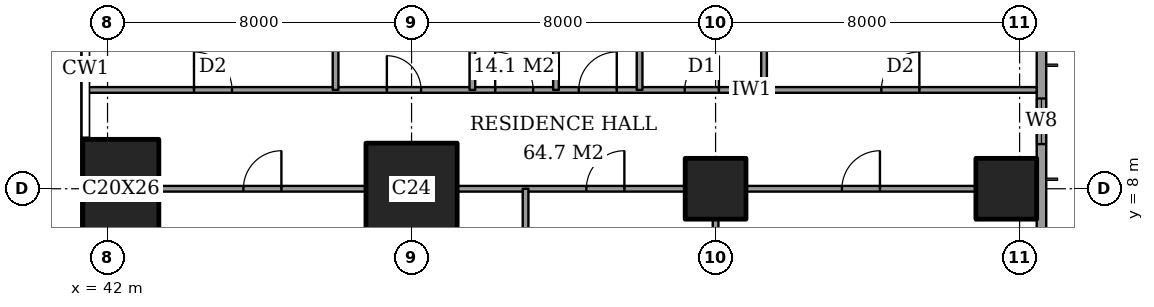
"""IFC4 building model, lengths in metres.
Left out: names, types, materials, properties, quantities, classifications, styles, units other than length and angle.
Written with IfcOpenShell. Run it as: python <this file> out.ifc"""

import sys

from ifc_helpers import new_model, si_unit, direction, frame, frame_2d, origin, origin_2d, place, context, subcontext, project, spatial, rectangle, extrude, element, fill, save


model = new_model("IFC4")
c1 = context("Model", 3, precision=1e-05, world=origin(), true_north=direction((0.0, 1.0)))
c2 = subcontext(c1, "Body", "Model", "MODEL_VIEW")
j1 = project(units=[si_unit("LENGTHUNIT", "METRE"), si_unit("PLANEANGLEUNIT", "RADIAN")], contexts=[c1])
p1 = place(None, origin())
s1 = spatial("IfcSite", under=j1, at=p1, CompositionType="ELEMENT")
p2 = place(p1, origin())
s2 = spatial("IfcBuilding", under=s1, at=p2, CompositionType="ELEMENT")
p3 = place(p2, frame((0.0, 0.0, 270.0)))
s3 = spatial("IfcBuildingStorey", under=s2, at=p3, CompositionType="ELEMENT", Elevation=270.0)
p4 = place(p3, frame((42.35, 8.0, 0.0), z_axis=(0.0, 0.0, 1.0), x_axis=(1.0, 0.0, 0.0)))
e1 = element("IfcColumn", 1, at=p4, inside=s3, PredefinedType="COLUMN", context=c2, shape_type="SweptSolid", body=[
    extrude(rectangle(XDim=2.0, YDim=2.6, at=origin_2d()), origin(), (0.0, 0.0, 1.0), 3.6),
])
p5 = place(p3, frame((50.0, 8.0, 0.0), z_axis=(0.0, 0.0, 1.0), x_axis=(1.0, 0.0, 0.0)))
e2 = element("IfcColumn", 2, at=p5, inside=s3, PredefinedType="COLUMN", context=c2, shape_type="SweptSolid", body=[
    extrude(rectangle(XDim=2.4, YDim=2.4, at=origin_2d()), origin(), (0.0, 0.0, 1.0), 3.6),
])
for number, where, z_axis, x_axis in (
    (3, (58.0, 8.0, 0.0), (0.0, 0.0, 1.0), (1.0, 0.0, 0.0)),
    (4, (65.65, 8.0, 0.0), (0.0, 0.0, 1.0), (1.0, 0.0, 0.0)),
):
    element("IfcColumn", number, at=place(p3, frame(where, z_axis=z_axis, x_axis=x_axis)), inside=s3, PredefinedType="COLUMN", context=c2, shape_type="SweptSolid", body=[
        extrude(rectangle(XDim=1.6, YDim=1.6, at=origin_2d()), origin(), (0.0, 0.0, 1.0), 3.6),
    ])
p6 = place(p3, frame((66.575, 3.175, 0.0), z_axis=(0.0, 0.0, 1.0), x_axis=(0.0, 1.0, 0.0)))
e5 = element("IfcWall", 5, at=p6, inside=s3, PredefinedType="SOLIDWALL", context=c2, shape_type="SweptSolid", body=[
    extrude(rectangle(XDim=41.65, YDim=0.25, at=frame_2d((20.825, 0.0))), origin(), (0.0, 0.0, 1.0), 3.6),
])
p7 = place(p6, frame((0.875, 0.0, 0.6)))
e6 = element("IfcOpeningElement", 6, at=p7, cuts=e5, PredefinedType="OPENING", context=c2, shape_type="SweptSolid", body=[
    extrude(rectangle(XDim=2.4, YDim=2.0, at=frame_2d((1.2, 1.0))), frame((0.0, 0.135, 0.0), z_axis=(0.0, -1.0, 0.0), x_axis=(1.0, 0.0, 0.0)), (0.0, 0.0, 1.0), 0.27),
])
p8 = place(p6, frame((6.0, 0.0, 0.6)))
e7 = element("IfcOpeningElement", 7, at=p8, cuts=e5, PredefinedType="OPENING", context=c2, shape_type="SweptSolid", body=[
    extrude(rectangle(XDim=1.2, YDim=2.0, at=frame_2d((0.6, 1.0))), frame((0.0, 0.135, 0.0), z_axis=(0.0, -1.0, 0.0), x_axis=(1.0, 0.0, 0.0)), (0.0, 0.0, 1.0), 0.27),
])
p9 = place(p6, frame((8.525, 0.0, 0.6)))
e8 = element("IfcOpeningElement", 8, at=p9, cuts=e5, PredefinedType="OPENING", context=c2, shape_type="SweptSolid", body=[
    extrude(rectangle(XDim=2.4, YDim=2.0, at=frame_2d((1.2, 1.0))), frame((0.0, 0.135, 0.0), z_axis=(0.0, -1.0, 0.0), x_axis=(1.0, 0.0, 0.0)), (0.0, 0.0, 1.0), 0.27),
])
p10 = place(p6, frame((15.725, 0.0, 0.6)))
e9 = element("IfcOpeningElement", 9, at=p10, cuts=e5, PredefinedType="OPENING", context=c2, shape_type="SweptSolid", body=[
    extrude(rectangle(XDim=2.4, YDim=2.0, at=frame_2d((1.2, 1.0))), frame((0.0, 0.135, 0.0), z_axis=(0.0, -1.0, 0.0), x_axis=(1.0, 0.0, 0.0)), (0.0, 0.0, 1.0), 0.27),
])
p11 = place(p6, frame((23.625, 0.0, 0.6)))
e10 = element("IfcOpeningElement", 10, at=p11, cuts=e5, PredefinedType="OPENING", context=c2, shape_type="SweptSolid", body=[
    extrude(rectangle(XDim=2.4, YDim=2.0, at=frame_2d((1.2, 1.0))), frame((0.0, 0.135, 0.0), z_axis=(0.0, -1.0, 0.0), x_axis=(1.0, 0.0, 0.0)), (0.0, 0.0, 1.0), 0.27),
])
p12 = place(p6, frame((30.725, 0.0, 0.6)))
e11 = element("IfcOpeningElement", 11, at=p12, cuts=e5, PredefinedType="OPENING", context=c2, shape_type="SweptSolid", body=[
    extrude(rectangle(XDim=2.4, YDim=2.0, at=frame_2d((1.2, 1.0))), frame((0.0, 0.135, 0.0), z_axis=(0.0, -1.0, 0.0), x_axis=(1.0, 0.0, 0.0)), (0.0, 0.0, 1.0), 0.27),
])
p13 = place(p6, frame((34.525, 0.0, 0.6)))
e12 = element("IfcOpeningElement", 12, at=p13, cuts=e5, PredefinedType="OPENING", context=c2, shape_type="SweptSolid", body=[
    extrude(rectangle(XDim=1.2, YDim=2.0, at=frame_2d((0.6, 1.0))), frame((0.0, 0.135, 0.0), z_axis=(0.0, -1.0, 0.0), x_axis=(1.0, 0.0, 0.0)), (0.0, 0.0, 1.0), 0.27),
])
p14 = place(p6, frame((38.375, 0.0, 0.6)))
e13 = element("IfcOpeningElement", 13, at=p14, cuts=e5, PredefinedType="OPENING", context=c2, shape_type="SweptSolid", body=[
    extrude(rectangle(XDim=2.4, YDim=2.0, at=frame_2d((1.2, 1.0))), frame((0.0, 0.135, 0.0), z_axis=(0.0, -1.0, 0.0), x_axis=(1.0, 0.0, 0.0)), (0.0, 0.0, 1.0), 0.27),
])
p15 = place(p3, frame((43.35, 8.0, 0.0), z_axis=(0.0, 0.0, 1.0), x_axis=(1.0, 0.0, 0.0)))
e14 = element("IfcWall", 14, at=p15, inside=s3, PredefinedType="PARTITIONING", context=c2, shape_type="SweptSolid", body=[
    extrude(rectangle(XDim=5.45, YDim=0.15, at=frame_2d((2.725, 0.0))), origin(), (0.0, 0.0, 1.0), 3.35),
])
p16 = place(p15, frame((2.225, 0.0, 0.0)))
e15 = element("IfcOpeningElement", 15, at=p16, cuts=e14, PredefinedType="OPENING", context=c2, shape_type="SweptSolid", body=[
    extrude(rectangle(XDim=1.0, YDim=2.1, at=frame_2d((0.5, 1.05))), frame((0.0, 0.085, 0.0), z_axis=(0.0, -1.0, 0.0), x_axis=(1.0, 0.0, 0.0)), (0.0, 0.0, 1.0), 0.17),
])
p17 = place(p3, frame((51.2, 8.0, 0.0), z_axis=(0.0, 0.0, 1.0), x_axis=(1.0, 0.0, 0.0)))
e16 = element("IfcWall", 16, at=p17, inside=s3, PredefinedType="PARTITIONING", context=c2, shape_type="SweptSolid", body=[
    extrude(rectangle(XDim=6.0, YDim=0.15, at=frame_2d((3.0, 0.0))), origin(), (0.0, 0.0, 1.0), 3.35),
])
p18 = place(p17, frame((3.4, 0.0, 0.0)))
e17 = element("IfcOpeningElement", 17, at=p18, cuts=e16, PredefinedType="OPENING", context=c2, shape_type="SweptSolid", body=[
    extrude(rectangle(XDim=1.0, YDim=2.1, at=frame_2d((0.5, 1.05))), frame((0.0, 0.085, 0.0), z_axis=(0.0, -1.0, 0.0), x_axis=(1.0, 0.0, 0.0)), (0.0, 0.0, 1.0), 0.17),
])
p19 = place(p3, frame((58.8, 8.0, 0.0), z_axis=(0.0, 0.0, 1.0), x_axis=(1.0, 0.0, 0.0)))
e18 = element("IfcWall", 18, at=p19, inside=s3, PredefinedType="PARTITIONING", context=c2, shape_type="SweptSolid", body=[
    extrude(rectangle(XDim=6.05, YDim=0.15, at=frame_2d((3.025, 0.0))), origin(), (0.0, 0.0, 1.0), 3.35),
])
p20 = place(p19, frame((2.525, 0.0, 0.0)))
e19 = element("IfcOpeningElement", 19, at=p20, cuts=e18, PredefinedType="OPENING", context=c2, shape_type="SweptSolid", body=[
    extrude(rectangle(XDim=1.0, YDim=2.1, at=frame_2d((0.5, 1.05))), frame((0.0, 0.085, 0.0), z_axis=(0.0, -1.0, 0.0), x_axis=(1.0, 0.0, 0.0)), (0.0, 0.0, 1.0), 0.17),
])
p21 = place(p3, frame((41.439, 10.6, 0.0), z_axis=(0.0, 0.0, 1.0), x_axis=(1.0, 0.0, 0.0)))
e20 = element("IfcWall", 20, at=p21, inside=s3, PredefinedType="PARTITIONING", context=c2, shape_type="SweptSolid", body=[
    extrude(rectangle(XDim=25.011, YDim=0.15, at=frame_2d((12.505, 0.0))), origin(), (0.0, 0.0, 1.0), 3.35),
])
p22 = place(p21, frame((10.761, 0.0, 0.0)))
e21 = element("IfcOpeningElement", 21, at=p22, cuts=e20, PredefinedType="OPENING", context=c2, shape_type="SweptSolid", body=[
    extrude(rectangle(XDim=1.0, YDim=2.1, at=frame_2d((0.5, 1.05))), frame((0.0, 0.085, 0.0), z_axis=(0.0, -1.0, 0.0), x_axis=(1.0, 0.0, 0.0)), (0.0, 0.0, 1.0), 0.17),
])
p23 = place(p21, frame((20.924, 0.0, 0.0)))
e22 = element("IfcOpeningElement", 22, at=p23, cuts=e20, PredefinedType="OPENING", context=c2, shape_type="SweptSolid", body=[
    extrude(rectangle(XDim=1.0, YDim=2.1, at=frame_2d((0.5, 1.05))), frame((0.0, 0.085, 0.0), z_axis=(0.0, -1.0, 0.0), x_axis=(1.0, 0.0, 0.0)), (0.0, 0.0, 1.0), 0.17),
])
p24 = place(p21, frame((15.749, 0.0, 0.0)))
e23 = element("IfcOpeningElement", 23, at=p24, cuts=e20, PredefinedType="OPENING", context=c2, shape_type="SweptSolid", body=[
    extrude(rectangle(XDim=0.9, YDim=2.1, at=frame_2d((0.45, 1.05))), frame((0.0, 0.085, 0.0), z_axis=(0.0, -1.0, 0.0), x_axis=(1.0, 0.0, 0.0)), (0.0, 0.0, 1.0), 0.17),
])
p25 = place(p21, frame((12.961, 0.0, 0.0)))
e24 = element("IfcOpeningElement", 24, at=p25, cuts=e20, PredefinedType="OPENING", context=c2, shape_type="SweptSolid", body=[
    extrude(rectangle(XDim=1.0, YDim=2.1, at=frame_2d((0.5, 1.05))), frame((0.0, 0.085, 0.0), z_axis=(0.0, -1.0, 0.0), x_axis=(1.0, 0.0, 0.0)), (0.0, 0.0, 1.0), 0.17),
])
p26 = place(p21, frame((7.911, 0.0, 0.0)))
e25 = element("IfcOpeningElement", 25, at=p26, cuts=e20, PredefinedType="OPENING", context=c2, shape_type="SweptSolid", body=[
    extrude(rectangle(XDim=0.9, YDim=2.1, at=frame_2d((0.45, 1.05))), frame((0.0, 0.085, 0.0), z_axis=(0.0, -1.0, 0.0), x_axis=(1.0, 0.0, 0.0)), (0.0, 0.0, 1.0), 0.17),
])
p27 = place(p21, frame((2.836, 0.0, 0.0)))
e26 = element("IfcOpeningElement", 26, at=p27, cuts=e20, PredefinedType="OPENING", context=c2, shape_type="SweptSolid", body=[
    extrude(rectangle(XDim=1.0, YDim=2.1, at=frame_2d((0.5, 1.05))), frame((0.0, 0.085, 0.0), z_axis=(0.0, -1.0, 0.0), x_axis=(1.0, 0.0, 0.0)), (0.0, 0.0, 1.0), 0.17),
])
for number, where, z_axis, x_axis in (
    (27, (48.0, 10.6, 0.0), (0.0, 0.0, 1.0), (0.0, 1.0, 0.0)),
    (28, (51.6, 10.6, 0.0), (0.0, 0.0, 1.0), (0.0, 1.0, 0.0)),
):
    element("IfcWall", number, at=place(p3, frame(where, z_axis=z_axis, x_axis=x_axis)), inside=s3, PredefinedType="PARTITIONING", context=c2, shape_type="SweptSolid", body=[
        extrude(rectangle(XDim=6.4, YDim=0.15, at=frame_2d((3.2, 0.0))), origin(), (0.0, 0.0, 1.0), 3.35),
    ])
p28 = place(p3, frame((53.0, -0.45, 0.0), z_axis=(0.0, 0.0, 1.0), x_axis=(0.0, 1.0, 0.0)))
e29 = element("IfcWall", 29, at=p28, inside=s3, PredefinedType="PARTITIONING", context=c2, shape_type="SweptSolid", body=[
    extrude(rectangle(XDim=8.45, YDim=0.15, at=frame_2d((4.225, 0.0))), origin(), (0.0, 0.0, 1.0), 3.35),
])
p29 = place(p3, frame((53.8, 10.6, 0.0), z_axis=(0.0, 0.0, 1.0), x_axis=(0.0, 1.0, 0.0)))
e30 = element("IfcWall", 30, at=p29, inside=s3, PredefinedType="PARTITIONING", context=c2, shape_type="SweptSolid", body=[
    extrude(rectangle(XDim=6.4, YDim=0.15, at=frame_2d((3.2, 0.0))), origin(), (0.0, 0.0, 1.0), 3.35),
])
p30 = place(p3, frame((56.0, 10.6, 0.0), z_axis=(0.0, 0.0, 1.0), x_axis=(0.0, 1.0, 0.0)))
e31 = element("IfcWall", 31, at=p30, inside=s3, PredefinedType="PARTITIONING", context=c2, shape_type="SweptSolid", body=[
    extrude(rectangle(XDim=11.0, YDim=0.15, at=frame_2d((5.5, 0.0))), origin(), (0.0, 0.0, 1.0), 3.35),
])
p31 = place(p30, frame((8.2, 0.0, 0.0)))
e32 = element("IfcOpeningElement", 32, at=p31, cuts=e31, PredefinedType="OPENING", context=c2, shape_type="SweptSolid", body=[
    extrude(rectangle(XDim=1.0, YDim=2.1, at=frame_2d((0.5, 1.05))), frame((0.0, 0.085, 0.0), z_axis=(0.0, -1.0, 0.0), x_axis=(1.0, 0.0, 0.0)), (0.0, 0.0, 1.0), 0.17),
])
p32 = place(p3, frame((58.0, 1.15, 0.0), z_axis=(0.0, 0.0, 1.0), x_axis=(0.0, 1.0, 0.0)))
e33 = element("IfcWall", 33, at=p32, inside=s3, PredefinedType="PARTITIONING", context=c2, shape_type="SweptSolid", body=[
    extrude(rectangle(XDim=6.05, YDim=0.15, at=frame_2d((3.025, 0.0))), origin(), (0.0, 0.0, 1.0), 3.35),
])
p33 = place(p3, frame((59.275, 10.6, 0.0), z_axis=(0.0, 0.0, 1.0), x_axis=(0.0, 1.0, 0.0)))
e34 = element("IfcWall", 34, at=p33, inside=s3, PredefinedType="PARTITIONING", context=c2, shape_type="SweptSolid", body=[
    extrude(rectangle(XDim=4.2, YDim=0.15, at=frame_2d((2.1, 0.0))), origin(), (0.0, 0.0, 1.0), 3.35),
])
p34 = place(p8, origin())
e35 = element("IfcWindow", 35, at=p34, inside=s3, PartitioningType="SINGLE_PANEL", PredefinedType="WINDOW", context=c2, shape_type="SweptSolid", body=[
    extrude(rectangle(XDim=1.2, YDim=2.0, at=frame_2d((0.6, 1.0))), frame((0.0, 0.03, 0.0), z_axis=(0.0, -1.0, 0.0), x_axis=(1.0, 0.0, 0.0)), (0.0, 0.0, 1.0), 0.06),
])
fill(e7, e35)
p35 = place(p20, origin())
e36 = element("IfcDoor", 36, at=p35, inside=s3, OperationType="SINGLE_SWING_LEFT", PredefinedType="DOOR", context=c2, shape_type="SweptSolid", body=[
    extrude(rectangle(XDim=1.0, YDim=2.1, at=frame_2d((0.5, 1.05))), frame((0.0, 0.025, 0.0), z_axis=(0.0, -1.0, 0.0), x_axis=(1.0, 0.0, 0.0)), (0.0, 0.0, 1.0), 0.05),
])
fill(e19, e36)
p36 = place(p18, origin())
e37 = element("IfcDoor", 37, at=p36, inside=s3, OperationType="SINGLE_SWING_LEFT", PredefinedType="DOOR", context=c2, shape_type="SweptSolid", body=[
    extrude(rectangle(XDim=1.0, YDim=2.1, at=frame_2d((0.5, 1.05))), frame((0.0, 0.025, 0.0), z_axis=(0.0, -1.0, 0.0), x_axis=(1.0, 0.0, 0.0)), (0.0, 0.0, 1.0), 0.05),
])
fill(e17, e37)
p37 = place(p16, origin())
e38 = element("IfcDoor", 38, at=p37, inside=s3, OperationType="SINGLE_SWING_LEFT", PredefinedType="DOOR", context=c2, shape_type="SweptSolid", body=[
    extrude(rectangle(XDim=1.0, YDim=2.1, at=frame_2d((0.5, 1.05))), frame((0.0, 0.025, 0.0), z_axis=(0.0, -1.0, 0.0), x_axis=(1.0, 0.0, 0.0)), (0.0, 0.0, 1.0), 0.05),
])
fill(e15, e38)
p38 = place(p22, origin())
e39 = element("IfcDoor", 39, at=p38, inside=s3, OperationType="SINGLE_SWING_RIGHT", PredefinedType="DOOR", context=c2, shape_type="SweptSolid", body=[
    extrude(rectangle(XDim=1.0, YDim=2.1, at=frame_2d((0.5, 1.05))), frame((0.0, 0.025, 0.0), z_axis=(0.0, -1.0, 0.0), x_axis=(1.0, 0.0, 0.0)), (0.0, 0.0, 1.0), 0.05),
])
fill(e21, e39)
p39 = place(p23, origin())
e40 = element("IfcDoor", 40, at=p39, inside=s3, OperationType="SINGLE_SWING_LEFT", PredefinedType="DOOR", context=c2, shape_type="SweptSolid", body=[
    extrude(rectangle(XDim=1.0, YDim=2.1, at=frame_2d((0.5, 1.05))), frame((0.0, 0.025, 0.0), z_axis=(0.0, -1.0, 0.0), x_axis=(1.0, 0.0, 0.0)), (0.0, 0.0, 1.0), 0.05),
])
fill(e22, e40)
p40 = place(p24, origin())
e41 = element("IfcDoor", 41, at=p40, inside=s3, OperationType="SINGLE_SWING_LEFT", PredefinedType="DOOR", context=c2, shape_type="SweptSolid", body=[
    extrude(rectangle(XDim=0.9, YDim=2.1, at=frame_2d((0.45, 1.05))), frame((0.0, 0.025, 0.0), z_axis=(0.0, -1.0, 0.0), x_axis=(1.0, 0.0, 0.0)), (0.0, 0.0, 1.0), 0.05),
])
fill(e23, e41)
p41 = place(p25, origin())
e42 = element("IfcDoor", 42, at=p41, inside=s3, OperationType="SINGLE_SWING_LEFT", PredefinedType="DOOR", context=c2, shape_type="SweptSolid", body=[
    extrude(rectangle(XDim=1.0, YDim=2.1, at=frame_2d((0.5, 1.05))), frame((0.0, 0.025, 0.0), z_axis=(0.0, -1.0, 0.0), x_axis=(1.0, 0.0, 0.0)), (0.0, 0.0, 1.0), 0.05),
])
fill(e24, e42)
p42 = place(p26, origin())
e43 = element("IfcDoor", 43, at=p42, inside=s3, OperationType="SINGLE_SWING_RIGHT", PredefinedType="DOOR", context=c2, shape_type="SweptSolid", body=[
    extrude(rectangle(XDim=0.9, YDim=2.1, at=frame_2d((0.45, 1.05))), frame((0.0, 0.025, 0.0), z_axis=(0.0, -1.0, 0.0), x_axis=(1.0, 0.0, 0.0)), (0.0, 0.0, 1.0), 0.05),
])
fill(e25, e43)
p43 = place(p27, origin())
e44 = element("IfcDoor", 44, at=p43, inside=s3, OperationType="SINGLE_SWING_RIGHT", PredefinedType="DOOR", context=c2, shape_type="SweptSolid", body=[
    extrude(rectangle(XDim=1.0, YDim=2.1, at=frame_2d((0.5, 1.05))), frame((0.0, 0.025, 0.0), z_axis=(0.0, -1.0, 0.0), x_axis=(1.0, 0.0, 0.0)), (0.0, 0.0, 1.0), 0.05),
])
fill(e26, e44)
save(model, sys.argv[1])
